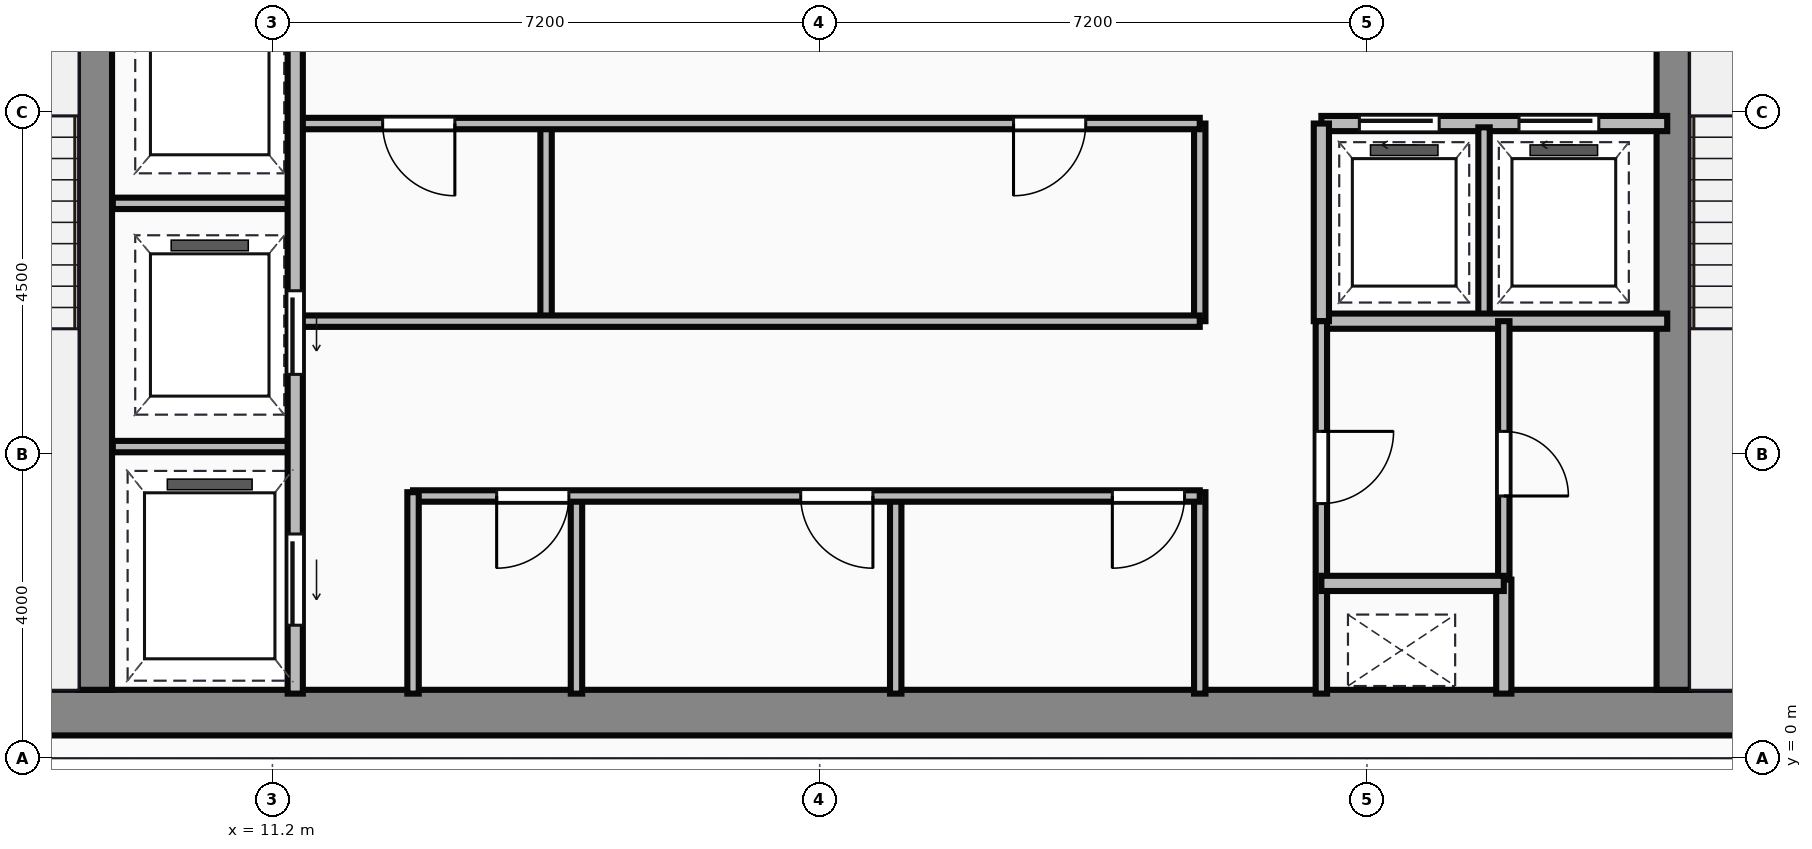
"""IFC4 building model, lengths in metres.
Left out: names, types, materials, properties, quantities, classifications, styles, units other than length and angle.
Written with IfcOpenShell. Run it as: python <this file> out.ifc"""

import sys

from ifc_helpers import new_model, si_unit, direction, frame, frame_2d, origin, place, context, subcontext, project, spatial, rectangle, extrude, source, transform, mapped, element, fill, save


model = new_model("IFC4")
c1 = context("Model", 3, precision=1e-05, world=origin(), true_north=direction((0.0, 1.0)))
c2 = subcontext(c1, "Body", "Model", "MODEL_VIEW")
j1 = project(units=[si_unit("LENGTHUNIT", "METRE"), si_unit("PLANEANGLEUNIT", "RADIAN")], contexts=[c1])
p1 = place(None, origin())
s1 = spatial("IfcSite", under=j1, at=p1, CompositionType="ELEMENT")
p2 = place(p1, origin())
s2 = spatial("IfcBuilding", under=s1, at=p2, CompositionType="ELEMENT")
p3 = place(p2, frame((0.0, 0.0, 269.75)))
s3 = spatial("IfcBuildingStorey", under=s2, at=p3, CompositionType="ELEMENT", Elevation=269.75)
m1 = source(origin(), c2, "Body", "SweptSolid", [
    extrude(rectangle(XDim=29.5, YDim=0.6, at=frame_2d((14.75, 0.0))), origin(), (0.0, 0.0, 1.0), 3.65),
])
p4 = place(p3, frame((4.5, 0.6, 0.0), z_axis=(0.0, 0.0, 1.0), x_axis=(1.0, 0.0, 0.0)))
e1 = element("IfcWall", 1, at=p4, inside=s3, PredefinedType="SHEAR", context=c2, shape_type="MappedRepresentation", body=[
    mapped(m1, transform((0.0, 0.0, 0.0))),
])
m2 = source(origin(), c2, "Body", "SweptSolid", [
    extrude(rectangle(XDim=12.5, YDim=0.45, at=frame_2d((6.25, 0.0))), origin(), (0.0, 0.0, 1.0), 3.65),
])
for number, where, z_axis, x_axis in (
    (2, (8.865, 0.9, 0.0), (0.0, 0.0, 1.0), (0.0, 1.0, 0.0)),
    (3, (29.635, 0.9, 0.0), (0.0, 0.0, 1.0), (0.0, 1.0, 0.0)),
):
    element("IfcWall", number, at=place(p3, frame(where, z_axis=z_axis, x_axis=x_axis)), inside=s3, PredefinedType="SHEAR", context=c2, shape_type="MappedRepresentation", body=[
        mapped(m2, transform((0.0, 0.0, 0.0))),
    ])
m3 = source(origin(), c2, "Body", "SweptSolid", [
    extrude(rectangle(XDim=9.6, YDim=0.2, at=frame_2d((4.8, 0.0))), origin(), (0.0, 0.0, 1.0), 3.4),
])
p5 = place(p3, frame((11.5, 0.85, 0.0), z_axis=(0.0, 0.0, 1.0), x_axis=(0.0, 1.0, 0.0)))
e4 = element("IfcWall", 4, at=p5, inside=s3, PredefinedType="PARTITIONING", context=c2, shape_type="MappedRepresentation", body=[
    mapped(m3, transform((0.0, 0.0, 0.0))),
])
p6 = place(p5, frame((4.2, 0.0, 0.0)))
e5 = element("IfcOpeningElement", 5, at=p6, cuts=e4, PredefinedType="OPENING", context=c2, shape_type="SweptSolid", body=[
    extrude(rectangle(XDim=1.1, YDim=2.15, at=frame_2d((0.55, 1.075))), frame((0.0, 0.11, 0.0), z_axis=(0.0, -1.0, 0.0), x_axis=(1.0, 0.0, 0.0)), (0.0, 0.0, 1.0), 0.22),
])
p7 = place(p5, frame((0.9, 0.0, 0.0)))
e6 = element("IfcOpeningElement", 6, at=p7, cuts=e4, PredefinedType="OPENING", context=c2, shape_type="SweptSolid", body=[
    extrude(rectangle(XDim=1.2, YDim=2.15, at=frame_2d((0.6, 1.075))), frame((0.0, 0.11, 0.0), z_axis=(0.0, -1.0, 0.0), x_axis=(1.0, 0.0, 0.0)), (0.0, 0.0, 1.0), 0.22),
])
m4 = source(origin(), c2, "Body", "SweptSolid", [
    extrude(rectangle(XDim=2.4, YDim=0.15, at=frame_2d((1.2, 0.0))), origin(), (0.0, 0.0, 1.0), 3.4),
])
for number, where, z_axis, x_axis in (
    (7, (9.1, 4.1, 0.0), (0.0, 0.0, 1.0), (1.0, 0.0, 0.0)),
    (8, (9.1, 7.3, 0.0), (0.0, 0.0, 1.0), (1.0, 0.0, 0.0)),
):
    element("IfcWall", number, at=place(p3, frame(where, z_axis=z_axis, x_axis=x_axis)), inside=s3, PredefinedType="PARTITIONING", context=c2, shape_type="MappedRepresentation", body=[
        mapped(m4, transform((0.0, 0.0, 0.0))),
    ])
m5 = source(origin(), c2, "Body", "SweptSolid", [
    extrude(rectangle(XDim=2.65, YDim=0.15, at=frame_2d((1.325, 0.0))), origin(), (0.0, 0.0, 1.0), 3.4),
])
p8 = place(p3, frame((13.05, 0.85, 0.0), z_axis=(0.0, 0.0, 1.0), x_axis=(0.0, 1.0, 0.0)))
e9 = element("IfcWall", 9, at=p8, inside=s3, PredefinedType="PARTITIONING", context=c2, shape_type="MappedRepresentation", body=[
    mapped(m5, transform((0.0, 0.0, 0.0))),
])
m6 = source(origin(), c2, "Body", "SweptSolid", [
    extrude(rectangle(XDim=10.35, YDim=0.15, at=frame_2d((5.175, 0.0))), origin(), (0.0, 0.0, 1.0), 3.4),
])
p9 = place(p3, frame((13.05, 3.45, 0.0), z_axis=(0.0, 0.0, 1.0), x_axis=(1.0, 0.0, 0.0)))
e10 = element("IfcWall", 10, at=p9, inside=s3, PredefinedType="PARTITIONING", context=c2, shape_type="MappedRepresentation", body=[
    mapped(m6, transform((0.0, 0.0, 0.0))),
])
p10 = place(p9, frame((1.1, 0.0, 0.0)))
e11 = element("IfcOpeningElement", 11, at=p10, cuts=e10, PredefinedType="OPENING", context=c2, shape_type="SweptSolid", body=[
    extrude(rectangle(XDim=0.95, YDim=2.15, at=frame_2d((0.475, 1.075))), frame((0.0, 0.085, 0.0), z_axis=(0.0, -1.0, 0.0), x_axis=(1.0, 0.0, 0.0)), (0.0, 0.0, 1.0), 0.17),
])
p11 = place(p9, frame((5.1, 0.0, 0.0)))
e12 = element("IfcOpeningElement", 12, at=p11, cuts=e10, PredefinedType="OPENING", context=c2, shape_type="SweptSolid", body=[
    extrude(rectangle(XDim=0.95, YDim=2.15, at=frame_2d((0.475, 1.075))), frame((0.0, 0.085, 0.0), z_axis=(0.0, -1.0, 0.0), x_axis=(1.0, 0.0, 0.0)), (0.0, 0.0, 1.0), 0.17),
])
p12 = place(p9, frame((9.2, 0.0, 0.0)))
e13 = element("IfcOpeningElement", 13, at=p12, cuts=e10, PredefinedType="OPENING", context=c2, shape_type="SweptSolid", body=[
    extrude(rectangle(XDim=0.95, YDim=2.15, at=frame_2d((0.475, 1.075))), frame((0.0, 0.085, 0.0), z_axis=(0.0, -1.0, 0.0), x_axis=(1.0, 0.0, 0.0)), (0.0, 0.0, 1.0), 0.17),
])
p13 = place(p3, frame((23.4, 0.85, 0.0), z_axis=(0.0, 0.0, 1.0), x_axis=(0.0, 1.0, 0.0)))
e14 = element("IfcWall", 14, at=p13, inside=s3, PredefinedType="PARTITIONING", context=c2, shape_type="MappedRepresentation", body=[
    mapped(m5, transform((0.0, 0.0, 0.0))),
])
m7 = source(origin(), c2, "Body", "SweptSolid", [
    extrude(rectangle(XDim=2.6, YDim=0.15, at=frame_2d((1.3, 0.0))), origin(), (0.0, 0.0, 1.0), 3.4),
])
for number, where, z_axis, x_axis in (
    (15, (15.2, 0.85, 0.0), (0.0, 0.0, 1.0), (0.0, 1.0, 0.0)),
    (16, (19.4, 0.85, 0.0), (0.0, 0.0, 1.0), (0.0, 1.0, 0.0)),
):
    element("IfcWall", number, at=place(p3, frame(where, z_axis=z_axis, x_axis=x_axis)), inside=s3, PredefinedType="PARTITIONING", context=c2, shape_type="MappedRepresentation", body=[
        mapped(m7, transform((0.0, 0.0, 0.0))),
    ])
m8 = source(origin(), c2, "Body", "SweptSolid", [
    extrude(rectangle(XDim=11.85, YDim=0.15, at=frame_2d((5.925, 0.0))), origin(), (0.0, 0.0, 1.0), 3.4),
])
p14 = place(p3, frame((11.55, 5.75, 0.0), z_axis=(0.0, 0.0, 1.0), x_axis=(1.0, 0.0, 0.0)))
e17 = element("IfcWall", 17, at=p14, inside=s3, PredefinedType="PARTITIONING", context=c2, shape_type="MappedRepresentation", body=[
    mapped(m8, transform((0.0, 0.0, 0.0))),
])
p15 = place(p3, frame((11.55, 8.35, 0.0), z_axis=(0.0, 0.0, 1.0), x_axis=(1.0, 0.0, 0.0)))
e18 = element("IfcWall", 18, at=p15, inside=s3, PredefinedType="PARTITIONING", context=c2, shape_type="MappedRepresentation", body=[
    mapped(m8, transform((0.0, 0.0, 0.0))),
])
p16 = place(p15, frame((1.1, 0.0, 0.0)))
e19 = element("IfcOpeningElement", 19, at=p16, cuts=e18, PredefinedType="OPENING", context=c2, shape_type="SweptSolid", body=[
    extrude(rectangle(XDim=0.95, YDim=2.15, at=frame_2d((0.475, 1.075))), frame((0.0, 0.085, 0.0), z_axis=(0.0, -1.0, 0.0), x_axis=(1.0, 0.0, 0.0)), (0.0, 0.0, 1.0), 0.17),
])
p17 = place(p15, frame((9.4, 0.0, 0.0)))
e20 = element("IfcOpeningElement", 20, at=p17, cuts=e18, PredefinedType="OPENING", context=c2, shape_type="SweptSolid", body=[
    extrude(rectangle(XDim=0.95, YDim=2.15, at=frame_2d((0.475, 1.075))), frame((0.0, 0.085, 0.0), z_axis=(0.0, -1.0, 0.0), x_axis=(1.0, 0.0, 0.0)), (0.0, 0.0, 1.0), 0.17),
])
m9 = source(origin(), c2, "Body", "SweptSolid", [
    extrude(rectangle(XDim=2.6, YDim=0.15, at=frame_2d((1.3, 0.0))), origin(), (0.0, 0.0, 1.0), 3.4),
])
p18 = place(p3, frame((23.4, 5.75, 0.0), z_axis=(0.0, 0.0, 1.0), x_axis=(0.0, 1.0, 0.0)))
e21 = element("IfcWall", 21, at=p18, inside=s3, PredefinedType="PARTITIONING", context=c2, shape_type="MappedRepresentation", body=[
    mapped(m9, transform((0.0, 0.0, 0.0))),
])
m10 = source(origin(), c2, "Body", "SweptSolid", [
    extrude(rectangle(XDim=2.5, YDim=0.15, at=frame_2d((1.25, 0.0))), origin(), (0.0, 0.0, 1.0), 3.4),
])
p19 = place(p3, frame((14.8, 5.8, 0.0), z_axis=(0.0, 0.0, 1.0), x_axis=(0.0, 1.0, 0.0)))
e22 = element("IfcWall", 22, at=p19, inside=s3, PredefinedType="PARTITIONING", context=c2, shape_type="MappedRepresentation", body=[
    mapped(m10, transform((0.0, 0.0, 0.0))),
])
m11 = source(origin(), c2, "Body", "SweptSolid", [
    extrude(rectangle(XDim=4.55, YDim=0.2, at=frame_2d((2.275, 0.0))), origin(), (0.0, 0.0, 1.0), 3.4),
])
p20 = place(p3, frame((25.0, 8.35, 0.0), z_axis=(0.0, 0.0, 1.0), x_axis=(1.0, 0.0, 0.0)))
e23 = element("IfcWall", 23, at=p20, inside=s3, PredefinedType="PARTITIONING", context=c2, shape_type="MappedRepresentation", body=[
    mapped(m11, transform((0.0, 0.0, 0.0))),
])
p21 = place(p20, frame((0.5, 0.0, 0.0)))
e24 = element("IfcOpeningElement", 24, at=p21, cuts=e23, PredefinedType="OPENING", context=c2, shape_type="SweptSolid", body=[
    extrude(rectangle(XDim=1.05, YDim=2.15, at=frame_2d((0.525, 1.075))), frame((0.0, 0.11, 0.0), z_axis=(0.0, -1.0, 0.0), x_axis=(1.0, 0.0, 0.0)), (0.0, 0.0, 1.0), 0.22),
])
p22 = place(p20, frame((2.6, 0.0, 0.0)))
e25 = element("IfcOpeningElement", 25, at=p22, cuts=e23, PredefinedType="OPENING", context=c2, shape_type="SweptSolid", body=[
    extrude(rectangle(XDim=1.05, YDim=2.15, at=frame_2d((0.525, 1.075))), frame((0.0, 0.11, 0.0), z_axis=(0.0, -1.0, 0.0), x_axis=(1.0, 0.0, 0.0)), (0.0, 0.0, 1.0), 0.22),
])
p23 = place(p3, frame((25.0, 5.75, 0.0), z_axis=(0.0, 0.0, 1.0), x_axis=(1.0, 0.0, 0.0)))
e26 = element("IfcWall", 26, at=p23, inside=s3, PredefinedType="PARTITIONING", context=c2, shape_type="MappedRepresentation", body=[
    mapped(m11, transform((0.0, 0.0, 0.0))),
])
m12 = source(origin(), c2, "Body", "SweptSolid", [
    extrude(rectangle(XDim=2.6, YDim=0.2, at=frame_2d((1.3, 0.0))), origin(), (0.0, 0.0, 1.0), 3.4),
])
p24 = place(p3, frame((25.0, 5.75, 0.0), z_axis=(0.0, 0.0, 1.0), x_axis=(0.0, 1.0, 0.0)))
e27 = element("IfcWall", 27, at=p24, inside=s3, PredefinedType="PARTITIONING", context=c2, shape_type="MappedRepresentation", body=[
    mapped(m12, transform((0.0, 0.0, 0.0))),
])
p25 = place(p3, frame((27.14, 5.8, 0.0), z_axis=(0.0, 0.0, 1.0), x_axis=(0.0, 1.0, 0.0)))
e28 = element("IfcWall", 28, at=p25, inside=s3, PredefinedType="PARTITIONING", context=c2, shape_type="MappedRepresentation", body=[
    mapped(m10, transform((0.0, 0.0, 0.0))),
])
m13 = source(origin(), c2, "Body", "SweptSolid", [
    extrude(rectangle(XDim=4.9, YDim=0.15, at=frame_2d((2.45, 0.0))), origin(), (0.0, 0.0, 1.0), 3.4),
])
p26 = place(p3, frame((25.0, 0.85, 0.0), z_axis=(0.0, 0.0, 1.0), x_axis=(0.0, 1.0, 0.0)))
e29 = element("IfcWall", 29, at=p26, inside=s3, PredefinedType="PARTITIONING", context=c2, shape_type="MappedRepresentation", body=[
    mapped(m13, transform((0.0, 0.0, 0.0))),
])
p27 = place(p26, frame((2.5, 0.0, 0.0)))
e30 = element("IfcOpeningElement", 30, at=p27, cuts=e29, PredefinedType="OPENING", context=c2, shape_type="SweptSolid", body=[
    extrude(rectangle(XDim=0.95, YDim=2.15, at=frame_2d((0.475, 1.075))), frame((0.0, 0.085, 0.0), z_axis=(0.0, -1.0, 0.0), x_axis=(1.0, 0.0, 0.0)), (0.0, 0.0, 1.0), 0.17),
])
m14 = source(origin(), c2, "Body", "SweptSolid", [
    extrude(rectangle(XDim=2.4, YDim=0.2, at=frame_2d((1.2, 0.0))), origin(), (0.0, 0.0, 1.0), 3.4),
])
p28 = place(p3, frame((25.0, 2.3, 0.0), z_axis=(0.0, 0.0, 1.0), x_axis=(1.0, 0.0, 0.0)))
e31 = element("IfcWall", 31, at=p28, inside=s3, PredefinedType="PARTITIONING", context=c2, shape_type="MappedRepresentation", body=[
    mapped(m14, transform((0.0, 0.0, 0.0))),
])
m15 = source(origin(), c2, "Body", "SweptSolid", [
    extrude(rectangle(XDim=1.5, YDim=0.2, at=frame_2d((0.75, 0.0))), origin(), (0.0, 0.0, 1.0), 3.4),
])
p29 = place(p3, frame((27.4, 0.85, 0.0), z_axis=(0.0, 0.0, 1.0), x_axis=(0.0, 1.0, 0.0)))
e32 = element("IfcWall", 32, at=p29, inside=s3, PredefinedType="PARTITIONING", context=c2, shape_type="MappedRepresentation", body=[
    mapped(m15, transform((0.0, 0.0, 0.0))),
])
m16 = source(origin(), c2, "Body", "SweptSolid", [
    extrude(rectangle(XDim=3.4, YDim=0.15, at=frame_2d((1.7, 0.0))), origin(), (0.0, 0.0, 1.0), 3.4),
])
p30 = place(p3, frame((27.4, 2.35, 0.0), z_axis=(0.0, 0.0, 1.0), x_axis=(0.0, 1.0, 0.0)))
e33 = element("IfcWall", 33, at=p30, inside=s3, PredefinedType="PARTITIONING", context=c2, shape_type="MappedRepresentation", body=[
    mapped(m16, transform((0.0, 0.0, 0.0))),
])
p31 = place(p30, frame((1.1, 0.0, 0.0)))
e34 = element("IfcOpeningElement", 34, at=p31, cuts=e33, PredefinedType="OPENING", context=c2, shape_type="SweptSolid", body=[
    extrude(rectangle(XDim=0.85, YDim=2.1, at=frame_2d((0.425, 1.05))), frame((0.0, 0.085, 0.0), z_axis=(0.0, -1.0, 0.0), x_axis=(1.0, 0.0, 0.0)), (0.0, 0.0, 1.0), 0.17),
])
m17 = source(origin(), c2, "Body", "SweptSolid", [
    extrude(rectangle(XDim=1.1, YDim=2.15, at=frame_2d((0.55, 1.075))), frame((0.0, 0.025, 0.0), z_axis=(0.0, -1.0, 0.0), x_axis=(1.0, 0.0, 0.0)), (0.0, 0.0, 1.0), 0.05),
])
p32 = place(p6, frame((1.1, 0.0, 0.0), z_axis=(0.0, 0.0, 1.0), x_axis=(-1.0, 0.0, 0.0)))
e35 = element("IfcDoor", 35, at=p32, inside=s3, OperationType="SLIDING_TO_LEFT", PredefinedType="DOOR", context=c2, shape_type="MappedRepresentation", body=[
    mapped(m17, transform((0.0, 0.0, 0.0))),
])
fill(e5, e35)
m18 = source(origin(), c2, "Body", "SweptSolid", [
    extrude(rectangle(XDim=1.2, YDim=2.15, at=frame_2d((0.6, 1.075))), frame((0.0, 0.025, 0.0), z_axis=(0.0, -1.0, 0.0), x_axis=(1.0, 0.0, 0.0)), (0.0, 0.0, 1.0), 0.05),
])
p33 = place(p7, frame((1.2, 0.0, 0.0), z_axis=(0.0, 0.0, 1.0), x_axis=(-1.0, 0.0, 0.0)))
e36 = element("IfcDoor", 36, at=p33, inside=s3, OperationType="SLIDING_TO_LEFT", PredefinedType="DOOR", context=c2, shape_type="MappedRepresentation", body=[
    mapped(m18, transform((0.0, 0.0, 0.0))),
])
fill(e6, e36)
m19 = source(origin(), c2, "Body", "SweptSolid", [
    extrude(rectangle(XDim=0.95, YDim=2.15, at=frame_2d((0.475, 1.075))), frame((0.0, 0.025, 0.0), z_axis=(0.0, -1.0, 0.0), x_axis=(1.0, 0.0, 0.0)), (0.0, 0.0, 1.0), 0.05),
])
p34 = place(p10, origin())
e37 = element("IfcDoor", 37, at=p34, inside=s3, OperationType="SINGLE_SWING_LEFT", PredefinedType="DOOR", context=c2, shape_type="MappedRepresentation", body=[
    mapped(m19, transform((0.0, 0.0, 0.0))),
])
fill(e11, e37)
p35 = place(p11, origin())
e38 = element("IfcDoor", 38, at=p35, inside=s3, OperationType="SINGLE_SWING_RIGHT", PredefinedType="DOOR", context=c2, shape_type="MappedRepresentation", body=[
    mapped(m19, transform((0.0, 0.0, 0.0))),
])
fill(e12, e38)
p36 = place(p12, origin())
e39 = element("IfcDoor", 39, at=p36, inside=s3, OperationType="SINGLE_SWING_LEFT", PredefinedType="DOOR", context=c2, shape_type="MappedRepresentation", body=[
    mapped(m19, transform((0.0, 0.0, 0.0))),
])
fill(e13, e39)
p37 = place(p16, origin())
e40 = element("IfcDoor", 40, at=p37, inside=s3, OperationType="SINGLE_SWING_RIGHT", PredefinedType="DOOR", context=c2, shape_type="MappedRepresentation", body=[
    mapped(m19, transform((0.0, 0.0, 0.0))),
])
fill(e19, e40)
p38 = place(p17, origin())
e41 = element("IfcDoor", 41, at=p38, inside=s3, OperationType="SINGLE_SWING_LEFT", PredefinedType="DOOR", context=c2, shape_type="MappedRepresentation", body=[
    mapped(m19, transform((0.0, 0.0, 0.0))),
])
fill(e20, e41)
m20 = source(origin(), c2, "Body", "SweptSolid", [
    extrude(rectangle(XDim=1.05, YDim=2.15, at=frame_2d((0.525, 1.075))), frame((0.0, 0.025, 0.0), z_axis=(0.0, -1.0, 0.0), x_axis=(1.0, 0.0, 0.0)), (0.0, 0.0, 1.0), 0.05),
])
p39 = place(p21, origin())
e42 = element("IfcDoor", 42, at=p39, inside=s3, OperationType="SLIDING_TO_LEFT", PredefinedType="DOOR", context=c2, shape_type="MappedRepresentation", body=[
    mapped(m20, transform((0.0, 0.0, 0.0))),
])
fill(e24, e42)
p40 = place(p22, origin())
e43 = element("IfcDoor", 43, at=p40, inside=s3, OperationType="SLIDING_TO_LEFT", PredefinedType="DOOR", context=c2, shape_type="MappedRepresentation", body=[
    mapped(m20, transform((0.0, 0.0, 0.0))),
])
fill(e25, e43)
p41 = place(p27, origin())
e44 = element("IfcDoor", 44, at=p41, inside=s3, OperationType="SINGLE_SWING_RIGHT", PredefinedType="DOOR", context=c2, shape_type="MappedRepresentation", body=[
    mapped(m19, transform((0.0, 0.0, 0.0))),
])
fill(e30, e44)
m21 = source(origin(), c2, "Body", "SweptSolid", [
    extrude(rectangle(XDim=0.85, YDim=2.1, at=frame_2d((0.425, 1.05))), frame((0.0, 0.025, 0.0), z_axis=(0.0, -1.0, 0.0), x_axis=(1.0, 0.0, 0.0)), (0.0, 0.0, 1.0), 0.05),
])
p42 = place(p31, frame((0.85, 0.0, 0.0), z_axis=(0.0, 0.0, 1.0), x_axis=(-1.0, 0.0, 0.0)))
e45 = element("IfcDoor", 45, at=p42, inside=s3, OperationType="SINGLE_SWING_LEFT", PredefinedType="DOOR", context=c2, shape_type="MappedRepresentation", body=[
    mapped(m21, transform((0.0, 0.0, 0.0))),
])
fill(e34, e45)
save(model, sys.argv[1])
